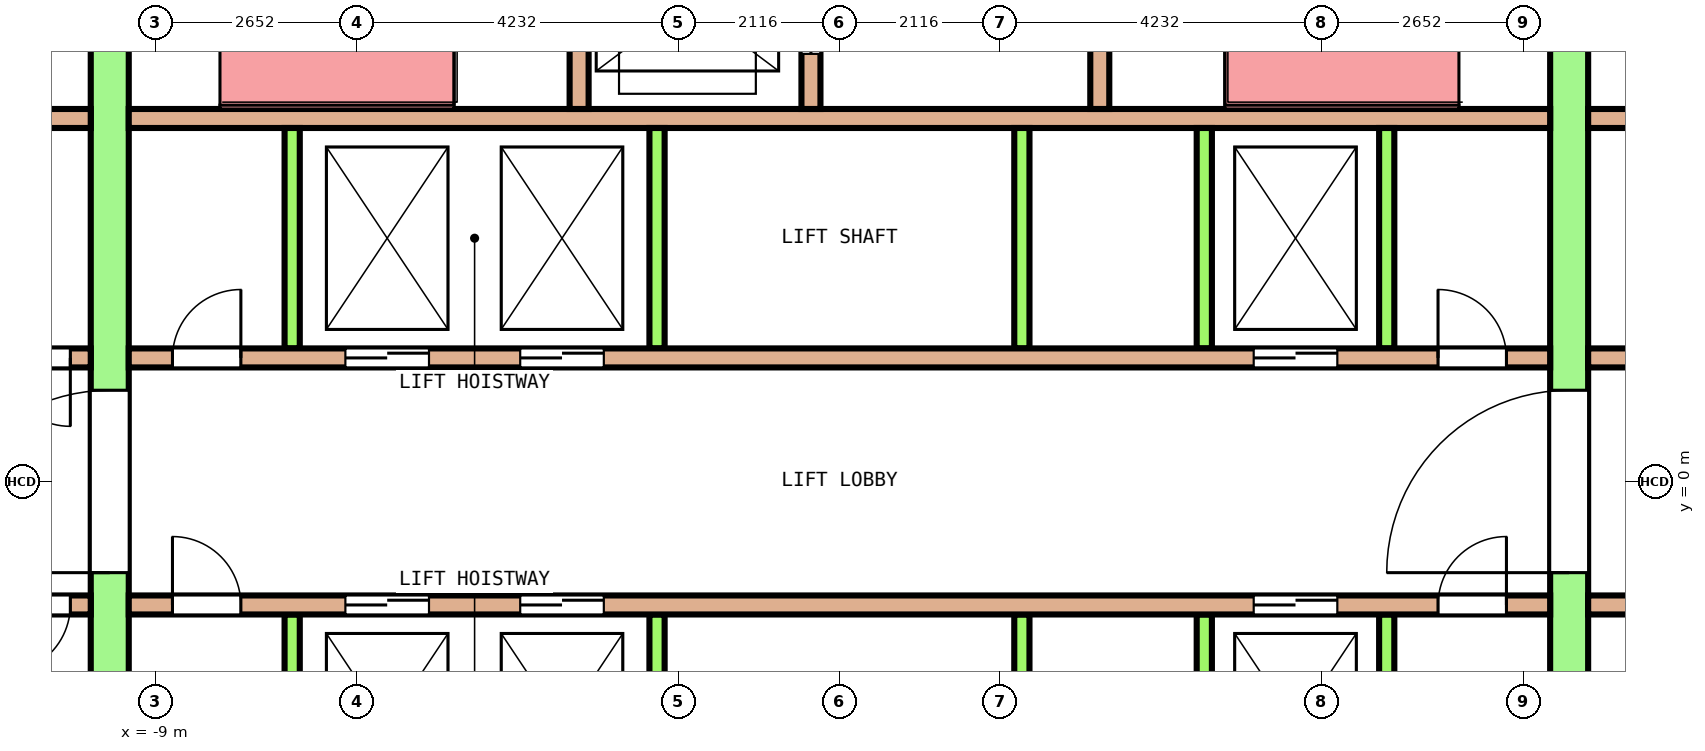
"""IFC4 building model, lengths in metres.
Left out: names, types, materials, properties, quantities, classifications, styles, units other than length and angle.
Written with IfcOpenShell. Run it as: python <this file> out.ifc"""

import sys

from ifc_helpers import new_model, si_unit, direction, frame, frame_2d, origin, place, context, subcontext, project, spatial, rectangle, extrude, element, fill, save


model = new_model("IFC4")
c1 = context("Model", 3, precision=1e-05, world=origin(), true_north=direction((0.0, 1.0)))
c2 = subcontext(c1, "Body", "Model", "MODEL_VIEW")
j1 = project(units=[si_unit("LENGTHUNIT", "METRE"), si_unit("PLANEANGLEUNIT", "RADIAN")], contexts=[c1])
p1 = place(None, origin())
s1 = spatial("IfcSite", under=j1, at=p1, CompositionType="ELEMENT")
p2 = place(p1, origin())
s2 = spatial("IfcBuilding", under=s1, at=p2, CompositionType="ELEMENT")
p3 = place(p2, frame((0.0, 0.0, 189.2)))
s3 = spatial("IfcBuildingStorey", under=s2, at=p3, CompositionType="ELEMENT", Elevation=189.2)
p4 = place(p3, frame((-9.6, -7.75, 0.0), z_axis=(0.0, 0.0, 1.0), x_axis=(0.0, 1.0, 0.0)))
e1 = element("IfcWall", 1, at=p4, inside=s3, PredefinedType="SHEAR", context=c2, shape_type="SweptSolid", body=[
    extrude(rectangle(XDim=15.5, YDim=0.5, at=frame_2d((7.75, 0.0))), origin(), (0.0, 0.0, 1.0), 4.1),
])
p5 = place(p4, frame((6.55, 0.0, 0.0)))
e2 = element("IfcOpeningElement", 2, at=p5, cuts=e1, PredefinedType="OPENING", context=c2, shape_type="SweptSolid", body=[
    extrude(rectangle(XDim=2.4, YDim=2.1, at=frame_2d((1.2, 1.05))), frame((0.0, 0.26, 0.0), z_axis=(0.0, -1.0, 0.0), x_axis=(1.0, 0.0, 0.0)), (0.0, 0.0, 1.0), 0.52),
])
p6 = place(p4, frame((13.45, 0.0, 0.0)))
e3 = element("IfcOpeningElement", 3, at=p6, cuts=e1, PredefinedType="OPENING", context=c2, shape_type="SweptSolid", body=[
    extrude(rectangle(XDim=1.2, YDim=2.1, at=frame_2d((0.6, 1.05))), frame((0.0, 0.26, 0.0), z_axis=(0.0, -1.0, 0.0), x_axis=(1.0, 0.0, 0.0)), (0.0, 0.0, 1.0), 0.52),
])
p7 = place(p4, frame((0.85, 0.0, 0.0)))
e4 = element("IfcOpeningElement", 4, at=p7, cuts=e1, PredefinedType="OPENING", context=c2, shape_type="SweptSolid", body=[
    extrude(rectangle(XDim=1.2, YDim=2.1, at=frame_2d((0.6, 1.05))), frame((0.0, 0.26, 0.0), z_axis=(0.0, -1.0, 0.0), x_axis=(1.0, 0.0, 0.0)), (0.0, 0.0, 1.0), 0.52),
])
p8 = place(p3, frame((9.6, -7.75, 0.0), z_axis=(0.0, 0.0, 1.0), x_axis=(0.0, 1.0, 0.0)))
e5 = element("IfcWall", 5, at=p8, inside=s3, PredefinedType="SHEAR", context=c2, shape_type="SweptSolid", body=[
    extrude(rectangle(XDim=15.5, YDim=0.5, at=frame_2d((7.75, 0.0))), origin(), (0.0, 0.0, 1.0), 4.1),
])
p9 = place(p8, frame((6.55, 0.0, 0.0)))
e6 = element("IfcOpeningElement", 6, at=p9, cuts=e5, PredefinedType="OPENING", context=c2, shape_type="SweptSolid", body=[
    extrude(rectangle(XDim=2.4, YDim=2.1, at=frame_2d((1.2, 1.05))), frame((0.0, 0.26, 0.0), z_axis=(0.0, -1.0, 0.0), x_axis=(1.0, 0.0, 0.0)), (0.0, 0.0, 1.0), 0.52),
])
p10 = place(p8, frame((13.45, 0.0, 0.0)))
e7 = element("IfcOpeningElement", 7, at=p10, cuts=e5, PredefinedType="OPENING", context=c2, shape_type="SweptSolid", body=[
    extrude(rectangle(XDim=1.2, YDim=2.1, at=frame_2d((0.6, 1.05))), frame((0.0, 0.26, 0.0), z_axis=(0.0, -1.0, 0.0), x_axis=(1.0, 0.0, 0.0)), (0.0, 0.0, 1.0), 0.52),
])
p11 = place(p8, frame((0.95, 0.0, 0.0)))
e8 = element("IfcOpeningElement", 8, at=p11, cuts=e5, PredefinedType="OPENING", context=c2, shape_type="SweptSolid", body=[
    extrude(rectangle(XDim=1.0, YDim=2.1, at=frame_2d((0.5, 1.05))), frame((0.0, 0.26, 0.0), z_axis=(0.0, -1.0, 0.0), x_axis=(1.0, 0.0, 0.0)), (0.0, 0.0, 1.0), 0.52),
])
p12 = place(p3, frame((-12.85, 1.625, 0.0), z_axis=(0.0, 0.0, 1.0), x_axis=(1.0, 0.0, 0.0)))
e9 = element("IfcWall", 9, at=p12, inside=s3, PredefinedType="SOLIDWALL", context=c2, shape_type="SweptSolid", body=[
    extrude(rectangle(XDim=3.0, YDim=0.25, at=frame_2d((1.5, 0.0))), origin(), (0.0, 0.0, 1.0), 4.1),
])
p13 = place(p12, frame((0.269, 0.0, 0.0)))
e10 = element("IfcOpeningElement", 10, at=p13, cuts=e9, PredefinedType="OPENING", context=c2, shape_type="SweptSolid", body=[
    extrude(rectangle(XDim=0.9, YDim=2.1, at=frame_2d((0.45, 1.05))), frame((0.0, 0.135, 0.0), z_axis=(0.0, -1.0, 0.0), x_axis=(1.0, 0.0, 0.0)), (0.0, 0.0, 1.0), 0.27),
])
p14 = place(p12, frame((1.831, 0.0, 0.0)))
e11 = element("IfcOpeningElement", 11, at=p14, cuts=e9, PredefinedType="OPENING", context=c2, shape_type="SweptSolid", body=[
    extrude(rectangle(XDim=0.9, YDim=2.1, at=frame_2d((0.45, 1.05))), frame((0.0, 0.135, 0.0), z_axis=(0.0, -1.0, 0.0), x_axis=(1.0, 0.0, 0.0)), (0.0, 0.0, 1.0), 0.27),
])
p15 = place(p3, frame((-9.35, 1.625, 0.0), z_axis=(0.0, 0.0, 1.0), x_axis=(1.0, 0.0, 0.0)))
e12 = element("IfcWall", 12, at=p15, inside=s3, PredefinedType="SOLIDWALL", context=c2, shape_type="SweptSolid", body=[
    extrude(rectangle(XDim=18.7, YDim=0.25, at=frame_2d((9.35, 0.0))), origin(), (0.0, 0.0, 1.0), 4.1),
])
p16 = place(p15, frame((2.85, 0.0, 0.0)))
e13 = element("IfcOpeningElement", 13, at=p16, cuts=e12, PredefinedType="OPENING", context=c2, shape_type="SweptSolid", body=[
    extrude(rectangle(XDim=1.1, YDim=2.1, at=frame_2d((0.55, 1.05))), frame((0.0, 0.135, 0.0), z_axis=(0.0, -1.0, 0.0), x_axis=(1.0, 0.0, 0.0)), (0.0, 0.0, 1.0), 0.27),
])
p17 = place(p15, frame((5.15, 0.0, 0.0)))
e14 = element("IfcOpeningElement", 14, at=p17, cuts=e12, PredefinedType="OPENING", context=c2, shape_type="SweptSolid", body=[
    extrude(rectangle(XDim=1.1, YDim=2.1, at=frame_2d((0.55, 1.05))), frame((0.0, 0.135, 0.0), z_axis=(0.0, -1.0, 0.0), x_axis=(1.0, 0.0, 0.0)), (0.0, 0.0, 1.0), 0.27),
])
p18 = place(p15, frame((14.8, 0.0, 0.0)))
e15 = element("IfcOpeningElement", 15, at=p18, cuts=e12, PredefinedType="OPENING", context=c2, shape_type="SweptSolid", body=[
    extrude(rectangle(XDim=1.1, YDim=2.1, at=frame_2d((0.55, 1.05))), frame((0.0, 0.135, 0.0), z_axis=(0.0, -1.0, 0.0), x_axis=(1.0, 0.0, 0.0)), (0.0, 0.0, 1.0), 0.27),
])
p19 = place(p15, frame((0.575, 0.0, 0.0)))
e16 = element("IfcOpeningElement", 16, at=p19, cuts=e12, PredefinedType="OPENING", context=c2, shape_type="SweptSolid", body=[
    extrude(rectangle(XDim=0.9, YDim=2.1, at=frame_2d((0.45, 1.05))), frame((0.0, 0.135, 0.0), z_axis=(0.0, -1.0, 0.0), x_axis=(1.0, 0.0, 0.0)), (0.0, 0.0, 1.0), 0.27),
])
p20 = place(p15, frame((17.225, 0.0, 0.0)))
e17 = element("IfcOpeningElement", 17, at=p20, cuts=e12, PredefinedType="OPENING", context=c2, shape_type="SweptSolid", body=[
    extrude(rectangle(XDim=0.9, YDim=2.1, at=frame_2d((0.45, 1.05))), frame((0.0, 0.135, 0.0), z_axis=(0.0, -1.0, 0.0), x_axis=(1.0, 0.0, 0.0)), (0.0, 0.0, 1.0), 0.27),
])
p21 = place(p3, frame((9.85, 1.625, 0.0), z_axis=(0.0, 0.0, 1.0), x_axis=(1.0, 0.0, 0.0)))
e18 = element("IfcWall", 18, at=p21, inside=s3, PredefinedType="SOLIDWALL", context=c2, shape_type="SweptSolid", body=[
    extrude(rectangle(XDim=3.0, YDim=0.25, at=frame_2d((1.5, 0.0))), origin(), (0.0, 0.0, 1.0), 4.1),
])
p22 = place(p21, frame((1.05, 0.0, 0.0)))
e19 = element("IfcOpeningElement", 19, at=p22, cuts=e18, PredefinedType="OPENING", context=c2, shape_type="SweptSolid", body=[
    extrude(rectangle(XDim=0.9, YDim=2.1, at=frame_2d((0.45, 1.05))), frame((0.0, 0.135, 0.0), z_axis=(0.0, -1.0, 0.0), x_axis=(1.0, 0.0, 0.0)), (0.0, 0.0, 1.0), 0.27),
])
p23 = place(p3, frame((-12.85, 4.775, 0.0), z_axis=(0.0, 0.0, 1.0), x_axis=(1.0, 0.0, 0.0)))
e20 = element("IfcWall", 20, at=p23, inside=s3, PredefinedType="SOLIDWALL", context=c2, shape_type="SweptSolid", body=[
    extrude(rectangle(XDim=3.0, YDim=0.25, at=frame_2d((1.5, 0.0))), origin(), (0.0, 0.0, 1.0), 4.1),
])
p24 = place(p3, frame((-9.35, 4.775, 0.0), z_axis=(0.0, 0.0, 1.0), x_axis=(1.0, 0.0, 0.0)))
e21 = element("IfcWall", 21, at=p24, inside=s3, PredefinedType="SOLIDWALL", context=c2, shape_type="SweptSolid", body=[
    extrude(rectangle(XDim=18.7, YDim=0.25, at=frame_2d((9.35, 0.0))), origin(), (0.0, 0.0, 1.0), 4.1),
])
p25 = place(p3, frame((9.85, 4.775, 0.0), z_axis=(0.0, 0.0, 1.0), x_axis=(1.0, 0.0, 0.0)))
e22 = element("IfcWall", 22, at=p25, inside=s3, PredefinedType="SOLIDWALL", context=c2, shape_type="SweptSolid", body=[
    extrude(rectangle(XDim=3.0, YDim=0.25, at=frame_2d((1.5, 0.0))), origin(), (0.0, 0.0, 1.0), 4.1),
])
for number, where, z_axis, x_axis in (
    (23, (-7.2, 1.75, 0.0), (0.0, 0.0, 1.0), (0.0, 1.0, 0.0)),
    (24, (-2.4, 1.75, 0.0), (0.0, 0.0, 1.0), (0.0, 1.0, 0.0)),
    (25, (2.4, 1.75, 0.0), (0.0, 0.0, 1.0), (0.0, 1.0, 0.0)),
    (26, (4.8, 1.75, 0.0), (0.0, 0.0, 1.0), (0.0, 1.0, 0.0)),
    (27, (7.2, 1.75, 0.0), (0.0, 0.0, 1.0), (0.0, 1.0, 0.0)),
):
    element("IfcWall", number, at=place(p3, frame(where, z_axis=z_axis, x_axis=x_axis)), inside=s3, PredefinedType="SOLIDWALL", context=c2, shape_type="SweptSolid", body=[
        extrude(rectangle(XDim=2.9, YDim=0.2, at=frame_2d((1.45, 0.0))), origin(), (0.0, 0.0, 1.0), 4.1),
    ])
p26 = place(p3, frame((-12.85, -1.625, 0.0), z_axis=(0.0, 0.0, 1.0), x_axis=(1.0, 0.0, 0.0)))
e28 = element("IfcWall", 28, at=p26, inside=s3, PredefinedType="SOLIDWALL", context=c2, shape_type="SweptSolid", body=[
    extrude(rectangle(XDim=3.0, YDim=0.25, at=frame_2d((1.5, 0.0))), origin(), (0.0, 0.0, 1.0), 4.1),
])
p27 = place(p26, frame((0.269, 0.0, 0.0)))
e29 = element("IfcOpeningElement", 29, at=p27, cuts=e28, PredefinedType="OPENING", context=c2, shape_type="SweptSolid", body=[
    extrude(rectangle(XDim=0.9, YDim=2.1, at=frame_2d((0.45, 1.05))), frame((0.0, 0.135, 0.0), z_axis=(0.0, -1.0, 0.0), x_axis=(1.0, 0.0, 0.0)), (0.0, 0.0, 1.0), 0.27),
])
p28 = place(p26, frame((1.831, 0.0, 0.0)))
e30 = element("IfcOpeningElement", 30, at=p28, cuts=e28, PredefinedType="OPENING", context=c2, shape_type="SweptSolid", body=[
    extrude(rectangle(XDim=0.9, YDim=2.1, at=frame_2d((0.45, 1.05))), frame((0.0, 0.135, 0.0), z_axis=(0.0, -1.0, 0.0), x_axis=(1.0, 0.0, 0.0)), (0.0, 0.0, 1.0), 0.27),
])
p29 = place(p3, frame((-9.35, -1.625, 0.0), z_axis=(0.0, 0.0, 1.0), x_axis=(1.0, 0.0, 0.0)))
e31 = element("IfcWall", 31, at=p29, inside=s3, PredefinedType="SOLIDWALL", context=c2, shape_type="SweptSolid", body=[
    extrude(rectangle(XDim=18.7, YDim=0.25, at=frame_2d((9.35, 0.0))), origin(), (0.0, 0.0, 1.0), 4.1),
])
p30 = place(p29, frame((2.85, 0.0, 0.0)))
e32 = element("IfcOpeningElement", 32, at=p30, cuts=e31, PredefinedType="OPENING", context=c2, shape_type="SweptSolid", body=[
    extrude(rectangle(XDim=1.1, YDim=2.1, at=frame_2d((0.55, 1.05))), frame((0.0, 0.135, 0.0), z_axis=(0.0, -1.0, 0.0), x_axis=(1.0, 0.0, 0.0)), (0.0, 0.0, 1.0), 0.27),
])
p31 = place(p29, frame((5.15, 0.0, 0.0)))
e33 = element("IfcOpeningElement", 33, at=p31, cuts=e31, PredefinedType="OPENING", context=c2, shape_type="SweptSolid", body=[
    extrude(rectangle(XDim=1.1, YDim=2.1, at=frame_2d((0.55, 1.05))), frame((0.0, 0.135, 0.0), z_axis=(0.0, -1.0, 0.0), x_axis=(1.0, 0.0, 0.0)), (0.0, 0.0, 1.0), 0.27),
])
p32 = place(p29, frame((14.8, 0.0, 0.0)))
e34 = element("IfcOpeningElement", 34, at=p32, cuts=e31, PredefinedType="OPENING", context=c2, shape_type="SweptSolid", body=[
    extrude(rectangle(XDim=1.1, YDim=2.1, at=frame_2d((0.55, 1.05))), frame((0.0, 0.135, 0.0), z_axis=(0.0, -1.0, 0.0), x_axis=(1.0, 0.0, 0.0)), (0.0, 0.0, 1.0), 0.27),
])
p33 = place(p29, frame((0.575, 0.0, 0.0)))
e35 = element("IfcOpeningElement", 35, at=p33, cuts=e31, PredefinedType="OPENING", context=c2, shape_type="SweptSolid", body=[
    extrude(rectangle(XDim=0.9, YDim=2.1, at=frame_2d((0.45, 1.05))), frame((0.0, 0.135, 0.0), z_axis=(0.0, -1.0, 0.0), x_axis=(1.0, 0.0, 0.0)), (0.0, 0.0, 1.0), 0.27),
])
p34 = place(p29, frame((17.225, 0.0, 0.0)))
e36 = element("IfcOpeningElement", 36, at=p34, cuts=e31, PredefinedType="OPENING", context=c2, shape_type="SweptSolid", body=[
    extrude(rectangle(XDim=0.9, YDim=2.1, at=frame_2d((0.45, 1.05))), frame((0.0, 0.135, 0.0), z_axis=(0.0, -1.0, 0.0), x_axis=(1.0, 0.0, 0.0)), (0.0, 0.0, 1.0), 0.27),
])
p35 = place(p3, frame((9.85, -1.625, 0.0), z_axis=(0.0, 0.0, 1.0), x_axis=(1.0, 0.0, 0.0)))
e37 = element("IfcWall", 37, at=p35, inside=s3, PredefinedType="SOLIDWALL", context=c2, shape_type="SweptSolid", body=[
    extrude(rectangle(XDim=3.0, YDim=0.25, at=frame_2d((1.5, 0.0))), origin(), (0.0, 0.0, 1.0), 4.1),
])
p36 = place(p35, frame((1.05, 0.0, 0.0)))
e38 = element("IfcOpeningElement", 38, at=p36, cuts=e37, PredefinedType="OPENING", context=c2, shape_type="SweptSolid", body=[
    extrude(rectangle(XDim=0.9, YDim=2.1, at=frame_2d((0.45, 1.05))), frame((0.0, 0.135, 0.0), z_axis=(0.0, -1.0, 0.0), x_axis=(1.0, 0.0, 0.0)), (0.0, 0.0, 1.0), 0.27),
])
for number, where, z_axis, x_axis in (
    (39, (-7.2, -4.65, 0.0), (0.0, 0.0, 1.0), (0.0, 1.0, 0.0)),
    (40, (-2.4, -4.65, 0.0), (0.0, 0.0, 1.0), (0.0, 1.0, 0.0)),
    (41, (2.4, -4.65, 0.0), (0.0, 0.0, 1.0), (0.0, 1.0, 0.0)),
    (42, (4.8, -4.65, 0.0), (0.0, 0.0, 1.0), (0.0, 1.0, 0.0)),
    (43, (7.2, -4.65, 0.0), (0.0, 0.0, 1.0), (0.0, 1.0, 0.0)),
):
    element("IfcWall", number, at=place(p3, frame(where, z_axis=z_axis, x_axis=x_axis)), inside=s3, PredefinedType="SOLIDWALL", context=c2, shape_type="SweptSolid", body=[
        extrude(rectangle(XDim=2.9, YDim=0.2, at=frame_2d((1.45, 0.0))), origin(), (0.0, 0.0, 1.0), 4.1),
    ])
p37 = place(p3, frame((-3.425, 4.9, 0.0), z_axis=(0.0, 0.0, 1.0), x_axis=(0.0, 1.0, 0.0)))
e44 = element("IfcWall", 44, at=p37, inside=s3, PredefinedType="SOLIDWALL", context=c2, shape_type="SweptSolid", body=[
    extrude(rectangle(XDim=2.85, YDim=0.25, at=frame_2d((1.425, 0.0))), origin(), (0.0, 0.0, 1.0), 4.1),
])
p38 = place(p3, frame((-0.375, 4.9, 0.0), z_axis=(0.0, 0.0, 1.0), x_axis=(0.0, 1.0, 0.0)))
e45 = element("IfcWall", 45, at=p38, inside=s3, PredefinedType="SOLIDWALL", context=c2, shape_type="SweptSolid", body=[
    extrude(rectangle(XDim=2.85, YDim=0.25, at=frame_2d((1.425, 0.0))), origin(), (0.0, 0.0, 1.0), 4.1),
])
p39 = place(p38, frame((0.725, 0.0, 0.0)))
e46 = element("IfcOpeningElement", 46, at=p39, cuts=e45, PredefinedType="OPENING", context=c2, shape_type="SweptSolid", body=[
    extrude(rectangle(XDim=1.4, YDim=2.1, at=frame_2d((0.7, 1.05))), frame((0.0, 0.135, 0.0), z_axis=(0.0, -1.0, 0.0), x_axis=(1.0, 0.0, 0.0)), (0.0, 0.0, 1.0), 0.27),
])
p40 = place(p3, frame((3.425, 4.9, 0.0), z_axis=(0.0, 0.0, 1.0), x_axis=(0.0, 1.0, 0.0)))
e47 = element("IfcWall", 47, at=p40, inside=s3, PredefinedType="SOLIDWALL", context=c2, shape_type="SweptSolid", body=[
    extrude(rectangle(XDim=2.85, YDim=0.25, at=frame_2d((1.425, 0.0))), origin(), (0.0, 0.0, 1.0), 4.1),
])
p41 = place(p16, origin())
e48 = element("IfcDoor", 48, at=p41, inside=s3, OperationType="DOUBLE_DOOR_SLIDING", PredefinedType="DOOR", context=c2, shape_type="SweptSolid", body=[
    extrude(rectangle(XDim=1.1, YDim=2.1, at=frame_2d((0.55, 1.05))), frame((0.0, 0.075, 0.0), z_axis=(0.0, -1.0, 0.0), x_axis=(1.0, 0.0, 0.0)), (0.0, 0.0, 1.0), 0.15),
])
fill(e13, e48)
p42 = place(p17, origin())
e49 = element("IfcDoor", 49, at=p42, inside=s3, OperationType="DOUBLE_DOOR_SLIDING", PredefinedType="DOOR", context=c2, shape_type="SweptSolid", body=[
    extrude(rectangle(XDim=1.1, YDim=2.1, at=frame_2d((0.55, 1.05))), frame((0.0, 0.075, 0.0), z_axis=(0.0, -1.0, 0.0), x_axis=(1.0, 0.0, 0.0)), (0.0, 0.0, 1.0), 0.15),
])
fill(e14, e49)
p43 = place(p18, origin())
e50 = element("IfcDoor", 50, at=p43, inside=s3, OperationType="DOUBLE_DOOR_SLIDING", PredefinedType="DOOR", context=c2, shape_type="SweptSolid", body=[
    extrude(rectangle(XDim=1.1, YDim=2.1, at=frame_2d((0.55, 1.05))), frame((0.0, 0.075, 0.0), z_axis=(0.0, -1.0, 0.0), x_axis=(1.0, 0.0, 0.0)), (0.0, 0.0, 1.0), 0.15),
])
fill(e15, e50)
p44 = place(p30, origin())
e51 = element("IfcDoor", 51, at=p44, inside=s3, OperationType="DOUBLE_DOOR_SLIDING", PredefinedType="DOOR", context=c2, shape_type="SweptSolid", body=[
    extrude(rectangle(XDim=1.1, YDim=2.1, at=frame_2d((0.55, 1.05))), frame((0.0, 0.075, 0.0), z_axis=(0.0, -1.0, 0.0), x_axis=(1.0, 0.0, 0.0)), (0.0, 0.0, 1.0), 0.15),
])
fill(e32, e51)
p45 = place(p31, origin())
e52 = element("IfcDoor", 52, at=p45, inside=s3, OperationType="DOUBLE_DOOR_SLIDING", PredefinedType="DOOR", context=c2, shape_type="SweptSolid", body=[
    extrude(rectangle(XDim=1.1, YDim=2.1, at=frame_2d((0.55, 1.05))), frame((0.0, 0.075, 0.0), z_axis=(0.0, -1.0, 0.0), x_axis=(1.0, 0.0, 0.0)), (0.0, 0.0, 1.0), 0.15),
])
fill(e33, e52)
p46 = place(p32, origin())
e53 = element("IfcDoor", 53, at=p46, inside=s3, OperationType="DOUBLE_DOOR_SLIDING", PredefinedType="DOOR", context=c2, shape_type="SweptSolid", body=[
    extrude(rectangle(XDim=1.1, YDim=2.1, at=frame_2d((0.55, 1.05))), frame((0.0, 0.075, 0.0), z_axis=(0.0, -1.0, 0.0), x_axis=(1.0, 0.0, 0.0)), (0.0, 0.0, 1.0), 0.15),
])
fill(e34, e53)
p47 = place(p39, origin())
e54 = element("IfcDoor", 54, at=p47, inside=s3, OperationType="DOUBLE_DOOR_SLIDING", PredefinedType="DOOR", context=c2, shape_type="SweptSolid", body=[
    extrude(rectangle(XDim=1.4, YDim=2.1, at=frame_2d((0.7, 1.05))), frame((0.0, 0.075, 0.0), z_axis=(0.0, -1.0, 0.0), x_axis=(1.0, 0.0, 0.0)), (0.0, 0.0, 1.0), 0.15),
])
fill(e46, e54)
p48 = place(p5, origin())
e55 = element("IfcDoor", 55, at=p48, inside=s3, OperationType="DOUBLE_DOOR_SINGLE_SWING", PredefinedType="DOOR", context=c2, shape_type="SweptSolid", body=[
    extrude(rectangle(XDim=2.4, YDim=2.1, at=frame_2d((1.2, 1.05))), frame((0.0, 0.2, 0.0), z_axis=(0.0, -1.0, 0.0), x_axis=(1.0, 0.0, 0.0)), (0.0, 0.0, 1.0), 0.4),
])
fill(e2, e55)
p49 = place(p9, origin())
e56 = element("IfcDoor", 56, at=p49, inside=s3, OperationType="DOUBLE_DOOR_SINGLE_SWING", PredefinedType="DOOR", context=c2, shape_type="SweptSolid", body=[
    extrude(rectangle(XDim=2.4, YDim=2.1, at=frame_2d((1.2, 1.05))), frame((0.0, 0.2, 0.0), z_axis=(0.0, -1.0, 0.0), x_axis=(1.0, 0.0, 0.0)), (0.0, 0.0, 1.0), 0.4),
])
fill(e6, e56)
p50 = place(p14, origin())
e57 = element("IfcDoor", 57, at=p50, inside=s3, OperationType="SINGLE_SWING_RIGHT", PredefinedType="DOOR", context=c2, shape_type="SweptSolid", body=[
    extrude(rectangle(XDim=0.9, YDim=2.1, at=frame_2d((0.45, 1.05))), frame((0.0, 0.075, 0.0), z_axis=(0.0, -1.0, 0.0), x_axis=(1.0, 0.0, 0.0)), (0.0, 0.0, 1.0), 0.15),
])
fill(e11, e57)
p51 = place(p19, origin())
e58 = element("IfcDoor", 58, at=p51, inside=s3, OperationType="SINGLE_SWING_LEFT", PredefinedType="DOOR", context=c2, shape_type="SweptSolid", body=[
    extrude(rectangle(XDim=0.9, YDim=2.1, at=frame_2d((0.45, 1.05))), frame((0.0, 0.075, 0.0), z_axis=(0.0, -1.0, 0.0), x_axis=(1.0, 0.0, 0.0)), (0.0, 0.0, 1.0), 0.15),
])
fill(e16, e58)
p52 = place(p20, origin())
e59 = element("IfcDoor", 59, at=p52, inside=s3, OperationType="SINGLE_SWING_RIGHT", PredefinedType="DOOR", context=c2, shape_type="SweptSolid", body=[
    extrude(rectangle(XDim=0.9, YDim=2.1, at=frame_2d((0.45, 1.05))), frame((0.0, 0.075, 0.0), z_axis=(0.0, -1.0, 0.0), x_axis=(1.0, 0.0, 0.0)), (0.0, 0.0, 1.0), 0.15),
])
fill(e17, e59)
p53 = place(p28, origin())
e60 = element("IfcDoor", 60, at=p53, inside=s3, OperationType="SINGLE_SWING_LEFT", PredefinedType="DOOR", context=c2, shape_type="SweptSolid", body=[
    extrude(rectangle(XDim=0.9, YDim=2.1, at=frame_2d((0.45, 1.05))), frame((0.0, 0.075, 0.0), z_axis=(0.0, -1.0, 0.0), x_axis=(1.0, 0.0, 0.0)), (0.0, 0.0, 1.0), 0.15),
])
fill(e30, e60)
p54 = place(p33, origin())
e61 = element("IfcDoor", 61, at=p54, inside=s3, OperationType="SINGLE_SWING_RIGHT", PredefinedType="DOOR", context=c2, shape_type="SweptSolid", body=[
    extrude(rectangle(XDim=0.9, YDim=2.1, at=frame_2d((0.45, 1.05))), frame((0.0, 0.075, 0.0), z_axis=(0.0, -1.0, 0.0), x_axis=(1.0, 0.0, 0.0)), (0.0, 0.0, 1.0), 0.15),
])
fill(e35, e61)
p55 = place(p34, origin())
e62 = element("IfcDoor", 62, at=p55, inside=s3, OperationType="SINGLE_SWING_LEFT", PredefinedType="DOOR", context=c2, shape_type="SweptSolid", body=[
    extrude(rectangle(XDim=0.9, YDim=2.1, at=frame_2d((0.45, 1.05))), frame((0.0, 0.075, 0.0), z_axis=(0.0, -1.0, 0.0), x_axis=(1.0, 0.0, 0.0)), (0.0, 0.0, 1.0), 0.15),
])
fill(e36, e62)
save(model, sys.argv[1])
